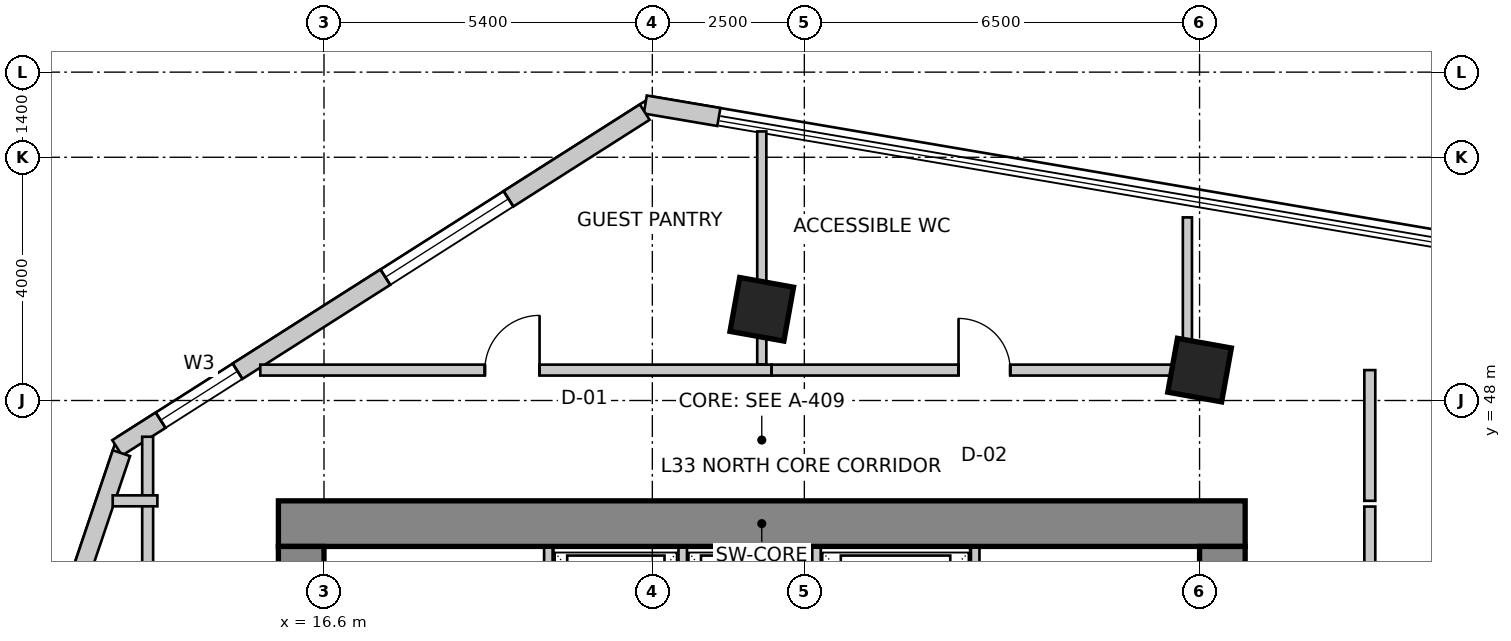
"""IFC4 building model, lengths in metres.
Left out: names, types, materials, properties, quantities, classifications, styles, units other than length and angle.
Written with IfcOpenShell. Run it as: python <this file> out.ifc"""

import sys

from ifc_helpers import new_model, si_unit, direction, frame, frame_2d, origin, origin_2d, place, context, subcontext, project, spatial, rectangle, extrude, source, transform, mapped, element, fill, save


model = new_model("IFC4")
c1 = context("Model", 3, precision=1e-05, world=origin(), true_north=direction((0.0, 1.0)))
c2 = subcontext(c1, "Body", "Model", "MODEL_VIEW")
j1 = project(units=[si_unit("LENGTHUNIT", "METRE"), si_unit("PLANEANGLEUNIT", "RADIAN")], contexts=[c1])
p1 = place(None, origin())
s1 = spatial("IfcSite", under=j1, at=p1, CompositionType="ELEMENT")
p2 = place(p1, origin())
s2 = spatial("IfcBuilding", under=s1, at=p2, CompositionType="ELEMENT")
p3 = place(p2, frame((0.0, 0.0, 135.8)))
s3 = spatial("IfcBuildingStorey", under=s2, at=p3, CompositionType="ELEMENT", Elevation=135.8)
p4 = place(p3, frame((15.85, 45.975, 0.0), z_axis=(0.0, 0.0, 1.0), x_axis=(1.0, 0.0, 0.0)))
e1 = element("IfcWall", 1, at=p4, inside=s3, PredefinedType="SHEAR", context=c2, shape_type="SweptSolid", body=[
    extrude(rectangle(XDim=15.9, YDim=0.75, at=frame_2d((7.95, 0.0))), origin(), (0.0, 0.0, 1.0), 3.6),
])
p5 = place(p3, frame((16.225, 34.2, 0.0), z_axis=(0.0, 0.0, 1.0), x_axis=(0.0, 1.0, 0.0)))
e2 = element("IfcWall", 2, at=p5, inside=s3, PredefinedType="SHEAR", context=c2, shape_type="SweptSolid", body=[
    extrude(rectangle(XDim=11.4, YDim=0.75, at=frame_2d((5.7, 0.0))), origin(), (0.0, 0.0, 1.0), 3.6),
])
m1 = source(origin(), c2, "Body", "SweptSolid", [
    extrude(rectangle(XDim=1.1, YDim=2.15, at=frame_2d((0.55, 1.075))), frame((0.0, 0.385, 0.0), z_axis=(0.0, -1.0, 0.0), x_axis=(1.0, 0.0, 0.0)), (0.0, 0.0, 1.0), 0.77),
])
p6 = place(p5, frame((7.15, 0.0, 0.0)))
e3 = element("IfcOpeningElement", 3, at=p6, cuts=e2, PredefinedType="OPENING", context=c2, shape_type="MappedRepresentation", body=[
    mapped(m1, transform((0.0, 0.0, 0.0), scale=1.0)),
])
p7 = place(p3, frame((31.375, 34.2, 0.0), z_axis=(0.0, 0.0, 1.0), x_axis=(0.0, 1.0, 0.0)))
e4 = element("IfcWall", 4, at=p7, inside=s3, PredefinedType="SHEAR", context=c2, shape_type="SweptSolid", body=[
    extrude(rectangle(XDim=11.4, YDim=0.75, at=frame_2d((5.7, 0.0))), origin(), (0.0, 0.0, 1.0), 3.6),
])
p8 = place(p7, frame((7.35, 0.0, 0.0)))
e5 = element("IfcOpeningElement", 5, at=p8, cuts=e4, PredefinedType="OPENING", context=c2, shape_type="MappedRepresentation", body=[
    mapped(m1, transform((0.0, 0.0, 0.0), scale=1.0)),
])
m2 = source(origin(), c2, "Body", "SweptSolid", [
    extrude(rectangle(XDim=0.9, YDim=0.9, at=origin_2d()), origin(), (0.0, 0.0, 1.0), 3.6),
])
for number, where, z_axis, x_axis in (
    (6, (23.8, 49.5, 0.0), (0.0, 0.0, 1.0), (0.984, -0.177, 0.0)),
    (7, (31.0, 48.5, 0.0), (0.0, 0.0, 1.0), (0.984, -0.177, 0.0)),
):
    element("IfcColumn", number, at=place(p3, frame(where, z_axis=z_axis, x_axis=x_axis)), inside=s3, PredefinedType="COLUMN", context=c2, shape_type="MappedRepresentation", body=[
        mapped(m2, transform((0.0, 0.0, 0.0), scale=1.0)),
    ])
p9 = place(p3, frame((23.094, 52.662, 0.0), z_axis=(0.0, 0.0, 1.0), x_axis=(-0.985845658291, 0.167655414553, 0.0)))
e8 = element("IfcWall", 8, at=p9, inside=s3, PredefinedType="SOLIDWALL", context=c2, shape_type="SweptSolid", body=[
    extrude(rectangle(XDim=1.228, YDim=0.3, at=frame_2d((0.614, 0.0))), origin(), (0.0, 0.0, 1.0), 3.3),
])
p10 = place(p3, frame((21.875, 52.742, 0.0), z_axis=(0.0, 0.0, 1.0), x_axis=(-0.843662465249, -0.536873956092, 0.0)))
e9 = element("IfcWall", 9, at=p10, inside=s3, PredefinedType="SOLIDWALL", context=c2, shape_type="SweptSolid", body=[
    extrude(rectangle(XDim=10.284, YDim=0.3, at=frame_2d((5.142, 0.0))), origin(), (0.0, 0.0, 1.0), 3.3),
])
m3 = source(origin(), c2, "Body", "SweptSolid", [
    extrude(rectangle(XDim=2.4, YDim=2.2, at=frame_2d((1.2, 1.1))), frame((0.0, 0.16, 0.0), z_axis=(0.0, -1.0, 0.0), x_axis=(1.0, 0.0, 0.0)), (0.0, 0.0, 1.0), 0.32),
])
p11 = place(p10, frame((2.656, 0.0, 0.85)))
e10 = element("IfcOpeningElement", 10, at=p11, cuts=e9, PredefinedType="OPENING", context=c2, shape_type="MappedRepresentation", body=[
    mapped(m3, transform((0.0, 0.0, 0.0), scale=1.0)),
])
m4 = source(origin(), c2, "Body", "SweptSolid", [
    extrude(rectangle(XDim=1.5, YDim=1.8, at=frame_2d((0.75, 0.9))), frame((0.0, 0.16, 0.0), z_axis=(0.0, -1.0, 0.0), x_axis=(1.0, 0.0, 0.0)), (0.0, 0.0, 1.0), 0.32),
])
p12 = place(p10, frame((7.937, 0.0, 0.85)))
e11 = element("IfcOpeningElement", 11, at=p12, cuts=e9, PredefinedType="OPENING", context=c2, shape_type="MappedRepresentation", body=[
    mapped(m4, transform((0.0, 0.0, 0.0), scale=1.0)),
])
p13 = place(p3, frame((13.269, 47.134, 0.0), z_axis=(0.0, 0.0, 1.0), x_axis=(-0.319929596295, -0.947441319246, 0.0)))
e12 = element("IfcWall", 12, at=p13, inside=s3, PredefinedType="SOLIDWALL", context=c2, shape_type="SweptSolid", body=[
    extrude(rectangle(XDim=16.134, YDim=0.3, at=frame_2d((8.067, 0.0))), origin(), (0.0, 0.0, 1.0), 3.3),
])
m5 = source(origin(), c2, "Body", "SweptSolid", [
    extrude(rectangle(XDim=2.1, YDim=2.0, at=frame_2d((1.05, 1.0))), frame((0.0, 0.16, 0.0), z_axis=(0.0, -1.0, 0.0), x_axis=(1.0, 0.0, 0.0)), (0.0, 0.0, 1.0), 0.32),
])
p14 = place(p13, frame((2.426, 0.0, 0.85)))
e13 = element("IfcOpeningElement", 13, at=p14, cuts=e12, PredefinedType="OPENING", context=c2, shape_type="MappedRepresentation", body=[
    mapped(m5, transform((0.0, 0.0, 0.0), scale=1.0)),
])
p15 = place(p13, frame((7.211, 0.0, 0.85)))
e14 = element("IfcOpeningElement", 14, at=p15, cuts=e12, PredefinedType="OPENING", context=c2, shape_type="MappedRepresentation", body=[
    mapped(m3, transform((0.0, 0.0, 0.0), scale=1.0)),
])
p16 = place(p13, frame((12.297, 0.0, 0.85)))
e15 = element("IfcOpeningElement", 15, at=p16, cuts=e12, PredefinedType="OPENING", context=c2, shape_type="MappedRepresentation", body=[
    mapped(m5, transform((0.0, 0.0, 0.0), scale=1.0)),
])
for number, where, z_axis, x_axis in (
    (16, (20.29, 43.28, 0.0), (0.0, 0.0, 1.0), (0.0, 1.0, 0.0)),
    (17, (27.31, 43.28, 0.0), (0.0, 0.0, 1.0), (0.0, 1.0, 0.0)),
):
    element("IfcWall", number, at=place(p3, frame(where, z_axis=z_axis, x_axis=x_axis)), inside=s3, PredefinedType="SOLIDWALL", context=c2, shape_type="SweptSolid", body=[
        extrude(rectangle(XDim=2.3, YDim=0.14, at=frame_2d((1.15, 0.0))), origin(), (0.0, 0.0, 1.0), 3.3),
    ])
for number, where, z_axis, x_axis in (
    (18, (22.5, 43.02, 0.0), (0.0, 0.0, 1.0), (0.0, 1.0, 0.0)),
    (19, (24.7, 43.02, 0.0), (0.0, 0.0, 1.0), (0.0, 1.0, 0.0)),
):
    element("IfcWall", number, at=place(p3, frame(where, z_axis=z_axis, x_axis=x_axis)), inside=s3, PredefinedType="SOLIDWALL", context=c2, shape_type="SweptSolid", body=[
        extrude(rectangle(XDim=2.56, YDim=0.14, at=frame_2d((1.28, 0.0))), origin(), (0.0, 0.0, 1.0), 3.3),
    ])
p17 = place(p3, frame((13.7, 33.544, 0.0), z_axis=(0.0, 0.0, 1.0), x_axis=(0.0, 1.0, 0.0)))
e20 = element("IfcWall", 20, at=p17, inside=s3, PredefinedType="PARTITIONING", context=c2, shape_type="SweptSolid", body=[
    extrude(rectangle(XDim=13.86, YDim=0.18, at=frame_2d((6.93, 0.0))), origin(), (0.0, 0.0, 1.0), 2.442),
])
m6 = source(origin(), c2, "Body", "SweptSolid", [
    extrude(rectangle(XDim=0.9, YDim=2.15, at=frame_2d((0.45, 1.075))), frame((0.0, 0.1, 0.0), z_axis=(0.0, -1.0, 0.0), x_axis=(1.0, 0.0, 0.0)), (0.0, 0.0, 1.0), 0.2),
])
p18 = place(p17, frame((4.253, 0.0, 0.0)))
e21 = element("IfcOpeningElement", 21, at=p18, cuts=e20, PredefinedType="OPENING", context=c2, shape_type="MappedRepresentation", body=[
    mapped(m6, transform((0.0, 0.0, 0.0), scale=1.0)),
])
p19 = place(p3, frame((13.86, 46.35, 0.0), z_axis=(0.0, 0.0, 1.0), x_axis=(-1.0, 0.0, 0.0)))
e22 = element("IfcWall", 22, at=p19, inside=s3, PredefinedType="PARTITIONING", context=c2, shape_type="SweptSolid", body=[
    extrude(rectangle(XDim=0.735, YDim=0.18, at=frame_2d((0.367, 0.0))), origin(), (0.0, 0.0, 1.0), 3.3),
])
p20 = place(p3, frame((15.552, 48.5, 0.0), z_axis=(0.0, 0.0, 1.0), x_axis=(1.0, 0.0, 0.0)))
e23 = element("IfcWall", 23, at=p20, inside=s3, PredefinedType="PARTITIONING", context=c2, shape_type="SweptSolid", body=[
    extrude(rectangle(XDim=8.407, YDim=0.18, at=frame_2d((4.204, 0.0))), origin(), (0.0, 0.0, 1.0), 2.885),
])
p21 = place(p20, frame((3.693, 0.0, 0.0)))
e24 = element("IfcOpeningElement", 24, at=p21, cuts=e23, PredefinedType="OPENING", context=c2, shape_type="MappedRepresentation", body=[
    mapped(m6, transform((0.0, 0.0, 0.0), scale=1.0)),
])
p22 = place(p3, frame((23.962, 48.5, 0.0), z_axis=(0.0, 0.0, 1.0), x_axis=(1.0, 0.0, 0.0)))
e25 = element("IfcWall", 25, at=p22, inside=s3, PredefinedType="PARTITIONING", context=c2, shape_type="SweptSolid", body=[
    extrude(rectangle(XDim=6.998, YDim=0.18, at=frame_2d((3.499, 0.0))), origin(), (0.0, 0.0, 1.0), 2.442),
])
m7 = source(origin(), c2, "Body", "SweptSolid", [
    extrude(rectangle(XDim=0.85, YDim=2.15, at=frame_2d((0.425, 1.075))), frame((0.0, 0.1, 0.0), z_axis=(0.0, -1.0, 0.0), x_axis=(1.0, 0.0, 0.0)), (0.0, 0.0, 1.0), 0.2),
])
p23 = place(p22, frame((3.074, 0.0, 0.0)))
e26 = element("IfcOpeningElement", 26, at=p23, cuts=e25, PredefinedType="OPENING", context=c2, shape_type="MappedRepresentation", body=[
    mapped(m7, transform((0.0, 0.0, 0.0), scale=1.0)),
])
p24 = place(p3, frame((33.8, 48.5, 0.0), z_axis=(0.0, 0.0, 1.0), x_axis=(0.0, -1.0, 0.0)))
e27 = element("IfcWall", 27, at=p24, inside=s3, PredefinedType="PARTITIONING", context=c2, shape_type="SweptSolid", body=[
    extrude(rectangle(XDim=2.15, YDim=0.18, at=frame_2d((1.075, 0.0))), origin(), (0.0, 0.0, 1.0), 2.442),
])
p25 = place(p3, frame((33.8, 46.256, 0.0), z_axis=(0.0, 0.0, 1.0), x_axis=(0.0, -1.0, 0.0)))
e28 = element("IfcWall", 28, at=p25, inside=s3, PredefinedType="PARTITIONING", context=c2, shape_type="SweptSolid", body=[
    extrude(rectangle(XDim=10.056, YDim=0.18, at=frame_2d((5.028, 0.0))), origin(), (0.0, 0.0, 1.0), 2.738),
])
m8 = source(origin(), c2, "Body", "SweptSolid", [
    extrude(rectangle(XDim=1.6, YDim=2.15, at=frame_2d((0.8, 1.075))), frame((0.0, 0.1, 0.0), z_axis=(0.0, -1.0, 0.0), x_axis=(1.0, 0.0, 0.0)), (0.0, 0.0, 1.0), 0.2),
])
p26 = place(p25, frame((4.167, 0.0, 0.0)))
e29 = element("IfcOpeningElement", 29, at=p26, cuts=e28, PredefinedType="OPENING", context=c2, shape_type="MappedRepresentation", body=[
    mapped(m8, transform((0.0, 0.0, 0.0), scale=1.0)),
])
p27 = place(p3, frame((23.8, 52.425, 0.0), z_axis=(0.0, 0.0, 1.0), x_axis=(0.0, -1.0, 0.0)))
e30 = element("IfcWall", 30, at=p27, inside=s3, PredefinedType="PARTITIONING", context=c2, shape_type="SweptSolid", body=[
    extrude(rectangle(XDim=3.831, YDim=0.15, at=frame_2d((1.916, 0.0))), origin(), (0.0, 0.0, 1.0), 2.442),
])
p28 = place(p3, frame((30.8, 51.011, 0.0), z_axis=(0.0, 0.0, 1.0), x_axis=(0.0, -1.0, 0.0)))
e31 = element("IfcWall", 31, at=p28, inside=s3, PredefinedType="PARTITIONING", context=c2, shape_type="SweptSolid", body=[
    extrude(rectangle(XDim=2.292, YDim=0.15, at=frame_2d((1.146, 0.0))), origin(), (0.0, 0.0, 1.0), 3.3),
])
m9 = source(origin(), c2, "Body", "SweptSolid", [
    extrude(rectangle(XDim=2.4, YDim=2.2, at=frame_2d((1.2, 1.1))), frame((0.0, -0.015, 0.0), z_axis=(0.0, -1.0, 0.0), x_axis=(1.0, 0.0, 0.0)), (0.0, 0.0, 1.0), 0.06),
])
p29 = place(p11, origin())
e32 = element("IfcWindow", 32, at=p29, inside=s3, PartitioningType="SINGLE_PANEL", PredefinedType="WINDOW", context=c2, shape_type="MappedRepresentation", body=[
    mapped(m9, transform((0.0, 0.0, 0.0), scale=1.0)),
])
fill(e10, e32)
m10 = source(origin(), c2, "Body", "SweptSolid", [
    extrude(rectangle(XDim=1.5, YDim=1.8, at=frame_2d((0.75, 0.9))), frame((0.0, -0.015, 0.0), z_axis=(0.0, -1.0, 0.0), x_axis=(1.0, 0.0, 0.0)), (0.0, 0.0, 1.0), 0.06),
])
p30 = place(p12, origin())
e33 = element("IfcWindow", 33, at=p30, inside=s3, PartitioningType="SINGLE_PANEL", PredefinedType="WINDOW", context=c2, shape_type="MappedRepresentation", body=[
    mapped(m10, transform((0.0, 0.0, 0.0), scale=1.0)),
])
fill(e11, e33)
m11 = source(origin(), c2, "Body", "SweptSolid", [
    extrude(rectangle(XDim=0.9, YDim=2.15, at=frame_2d((0.45, 1.075))), frame((0.0, 0.025, 0.0), z_axis=(0.0, -1.0, 0.0), x_axis=(1.0, 0.0, 0.0)), (0.0, 0.0, 1.0), 0.05),
])
p31 = place(p21, origin())
e34 = element("IfcDoor", 34, at=p31, inside=s3, OperationType="SINGLE_SWING_RIGHT", PredefinedType="DOOR", context=c2, shape_type="MappedRepresentation", body=[
    mapped(m11, transform((0.0, 0.0, 0.0), scale=1.0)),
])
fill(e24, e34)
m12 = source(origin(), c2, "Body", "SweptSolid", [
    extrude(rectangle(XDim=0.85, YDim=2.15, at=frame_2d((0.425, 1.075))), frame((0.0, 0.025, 0.0), z_axis=(0.0, -1.0, 0.0), x_axis=(1.0, 0.0, 0.0)), (0.0, 0.0, 1.0), 0.05),
])
p32 = place(p23, origin())
e35 = element("IfcDoor", 35, at=p32, inside=s3, OperationType="SINGLE_SWING_LEFT", PredefinedType="DOOR", context=c2, shape_type="MappedRepresentation", body=[
    mapped(m12, transform((0.0, 0.0, 0.0), scale=1.0)),
])
fill(e26, e35)
save(model, sys.argv[1])
